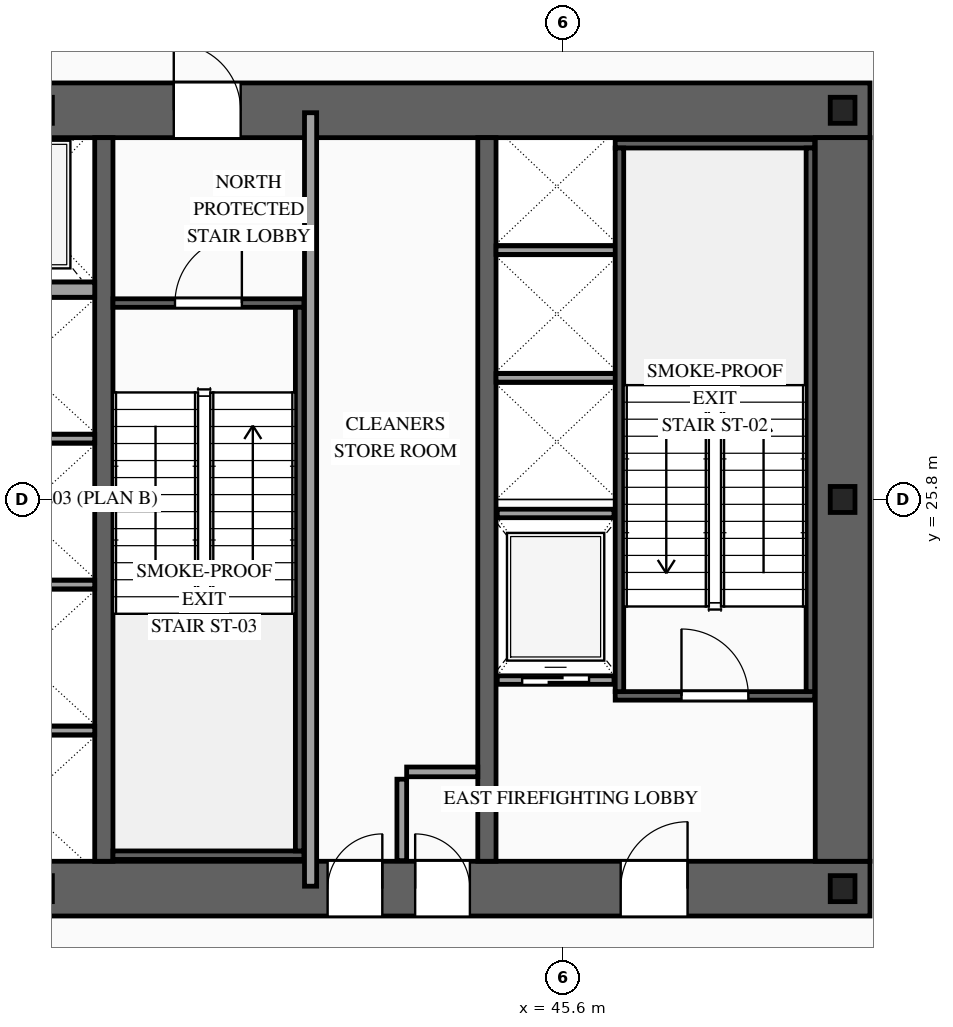
"""IFC4 building model, lengths in metres.
Left out: names, types, materials, properties, quantities, classifications, styles, units other than length and angle.
Written with IfcOpenShell. Run it as: python <this file> out.ifc"""

import sys

from ifc_helpers import new_model, si_unit, direction, frame, frame_2d, origin, origin_2d, place, context, subcontext, project, spatial, rectangle, i_section, extrude, source, transform, mapped, element, fill, save


model = new_model("IFC4")
c1 = context("Model", 3, precision=1e-05, world=origin(), true_north=direction((0.0, 1.0)))
c2 = subcontext(c1, "Body", "Model", "MODEL_VIEW")
j1 = project(units=[si_unit("LENGTHUNIT", "METRE"), si_unit("PLANEANGLEUNIT", "RADIAN")], contexts=[c1])
p1 = place(None, origin())
s1 = spatial("IfcSite", under=j1, at=p1, CompositionType="ELEMENT")
p2 = place(p1, origin())
s2 = spatial("IfcBuilding", under=s1, at=p2, CompositionType="ELEMENT")
p3 = place(p2, frame((0.0, 0.0, 10.2)))
s3 = spatial("IfcBuildingStorey", under=s2, at=p3, CompositionType="ELEMENT", Elevation=10.2)
p4 = place(p3, frame((23.35, 19.4, 0.0), z_axis=(0.0, 0.0, 1.0), x_axis=(1.0, 0.0, 0.0)))
e1 = element("IfcWall", 1, at=p4, inside=s3, PredefinedType="SHEAR", context=c2, shape_type="SweptSolid", body=[
    extrude(rectangle(XDim=27.3, YDim=0.9, at=frame_2d((13.65, 0.0))), origin(), (0.0, 0.0, 1.0), 4.8),
])
p5 = place(p4, frame((2.1, 0.0, 0.0)))
e2 = element("IfcOpeningElement", 2, at=p5, cuts=e1, PredefinedType="OPENING", context=c2, shape_type="SweptSolid", body=[
    extrude(rectangle(XDim=1.1, YDim=2.2, at=frame_2d((0.55, 1.1))), frame((0.0, 0.465, 0.0), z_axis=(0.0, -1.0, 0.0), x_axis=(1.0, 0.0, 0.0)), (0.0, 0.0, 1.0), 0.93),
])
p6 = place(p4, frame((10.0, 0.0, 0.0)))
e3 = element("IfcOpeningElement", 3, at=p6, cuts=e1, PredefinedType="OPENING", context=c2, shape_type="SweptSolid", body=[
    extrude(rectangle(XDim=1.1, YDim=2.2, at=frame_2d((0.55, 1.1))), frame((0.0, 0.465, 0.0), z_axis=(0.0, -1.0, 0.0), x_axis=(1.0, 0.0, 0.0)), (0.0, 0.0, 1.0), 0.93),
])
p7 = place(p4, frame((23.2, 0.0, 0.0)))
e4 = element("IfcOpeningElement", 4, at=p7, cuts=e1, PredefinedType="OPENING", context=c2, shape_type="SweptSolid", body=[
    extrude(rectangle(XDim=1.1, YDim=2.2, at=frame_2d((0.55, 1.1))), frame((0.0, 0.465, 0.0), z_axis=(0.0, -1.0, 0.0), x_axis=(1.0, 0.0, 0.0)), (0.0, 0.0, 1.0), 0.93),
])
p8 = place(p4, frame((19.82, 0.0, 0.0)))
e5 = element("IfcOpeningElement", 5, at=p8, cuts=e1, PredefinedType="OPENING", context=c2, shape_type="SweptSolid", body=[
    extrude(rectangle(XDim=0.9, YDim=2.15, at=frame_2d((0.45, 1.075))), frame((0.0, 0.465, 0.0), z_axis=(0.0, -1.0, 0.0), x_axis=(1.0, 0.0, 0.0)), (0.0, 0.0, 1.0), 0.93),
])
p9 = place(p4, frame((18.38, 0.0, 0.0)))
e6 = element("IfcOpeningElement", 6, at=p9, cuts=e1, PredefinedType="OPENING", context=c2, shape_type="SweptSolid", body=[
    extrude(rectangle(XDim=0.9, YDim=2.15, at=frame_2d((0.45, 1.075))), frame((0.0, 0.465, 0.0), z_axis=(0.0, -1.0, 0.0), x_axis=(1.0, 0.0, 0.0)), (0.0, 0.0, 1.0), 0.93),
])
p10 = place(p3, frame((23.35, 32.2, 0.0), z_axis=(0.0, 0.0, 1.0), x_axis=(1.0, 0.0, 0.0)))
e7 = element("IfcWall", 7, at=p10, inside=s3, PredefinedType="SHEAR", context=c2, shape_type="SweptSolid", body=[
    extrude(rectangle(XDim=27.3, YDim=0.9, at=frame_2d((13.65, 0.0))), origin(), (0.0, 0.0, 1.0), 4.8),
])
p11 = place(p10, frame((4.72, 0.0, 0.0)))
e8 = element("IfcOpeningElement", 8, at=p11, cuts=e7, PredefinedType="OPENING", context=c2, shape_type="SweptSolid", body=[
    extrude(rectangle(XDim=0.9, YDim=2.15, at=frame_2d((0.45, 1.075))), frame((0.0, 0.465, 0.0), z_axis=(0.0, -1.0, 0.0), x_axis=(1.0, 0.0, 0.0)), (0.0, 0.0, 1.0), 0.93),
])
p12 = place(p10, frame((10.0, 0.0, 0.0)))
e9 = element("IfcOpeningElement", 9, at=p12, cuts=e7, PredefinedType="OPENING", context=c2, shape_type="SweptSolid", body=[
    extrude(rectangle(XDim=1.1, YDim=2.2, at=frame_2d((0.55, 1.1))), frame((0.0, 0.465, 0.0), z_axis=(0.0, -1.0, 0.0), x_axis=(1.0, 0.0, 0.0)), (0.0, 0.0, 1.0), 0.93),
])
p13 = place(p10, frame((15.85, 0.0, 0.0)))
e10 = element("IfcOpeningElement", 10, at=p13, cuts=e7, PredefinedType="OPENING", context=c2, shape_type="SweptSolid", body=[
    extrude(rectangle(XDim=1.1, YDim=2.2, at=frame_2d((0.55, 1.1))), frame((0.0, 0.465, 0.0), z_axis=(0.0, -1.0, 0.0), x_axis=(1.0, 0.0, 0.0)), (0.0, 0.0, 1.0), 0.93),
])
m1 = source(origin(), c2, "Body", "SweptSolid", [
    extrude(rectangle(XDim=11.9, YDim=0.9, at=frame_2d((5.95, 0.0))), origin(), (0.0, 0.0, 1.0), 4.8),
])
p14 = place(p3, frame((50.2, 19.85, 0.0), z_axis=(0.0, 0.0, 1.0), x_axis=(0.0, 1.0, 0.0)))
e11 = element("IfcWall", 11, at=p14, inside=s3, PredefinedType="SHEAR", context=c2, shape_type="MappedRepresentation", body=[
    mapped(m1, transform((0.0, 0.0, 0.0), scale=1.0)),
])
m2 = source(origin(), c2, "Body", "SweptSolid", [
    extrude(rectangle(XDim=11.9, YDim=0.3, at=frame_2d((5.95, 0.0))), origin(), (0.0, 0.0, 1.0), 4.8),
])
for number, where, z_axis, x_axis in (
    (12, (38.05, 19.85, 0.0), (0.0, 0.0, 1.0), (0.0, 1.0, 0.0)),
    (13, (44.35, 19.85, 0.0), (0.0, 0.0, 1.0), (0.0, 1.0, 0.0)),
):
    element("IfcWall", number, at=place(p3, frame(where, z_axis=z_axis, x_axis=x_axis)), inside=s3, PredefinedType="SOLIDWALL", context=c2, shape_type="MappedRepresentation", body=[
        mapped(m2, transform((0.0, 0.0, 0.0), scale=1.0)),
    ])
m3 = source(origin(), c2, "Body", "SweptSolid", [
    extrude(i_section(OverallWidth=0.407, OverallDepth=0.428, WebThickness=0.02, FlangeThickness=0.035, at=origin_2d()), origin(), (0.0, 0.0, 1.0), 4.8),
])
for number, where, z_axis, x_axis in (
    (14, (37.0, 19.4, 0.0), (0.0, 0.0, 1.0), (1.0, 0.0, 0.0)),
    (15, (50.2, 19.4, 0.0), (0.0, 0.0, 1.0), (1.0, 0.0, 0.0)),
    (16, (50.2, 25.8, 0.0), (0.0, 0.0, 1.0), (1.0, 0.0, 0.0)),
    (17, (37.0, 32.2, 0.0), (0.0, 0.0, 1.0), (1.0, 0.0, 0.0)),
    (18, (50.2, 32.2, 0.0), (0.0, 0.0, 1.0), (1.0, 0.0, 0.0)),
):
    element("IfcColumn", number, at=place(p3, frame(where, z_axis=z_axis, x_axis=x_axis)), inside=s3, PredefinedType="COLUMN", context=c2, shape_type="MappedRepresentation", body=[
        mapped(m3, transform((0.0, 0.0, 0.0), scale=1.0)),
    ])
p15 = place(p3, frame((44.52, 22.83, 0.0), z_axis=(0.0, 0.0, 1.0), x_axis=(1.0, 0.0, 0.0)))
e19 = element("IfcWall", 19, at=p15, inside=s3, PredefinedType="SOLIDWALL", context=c2, shape_type="SweptSolid", body=[
    extrude(rectangle(XDim=1.92, YDim=0.14, at=frame_2d((0.96, 0.0))), origin(), (0.0, 0.0, 1.0), 4.52),
])
p16 = place(p15, frame((0.41, 0.0, 0.0)))
e20 = element("IfcOpeningElement", 20, at=p16, cuts=e19, PredefinedType="OPENING", context=c2, shape_type="SweptSolid", body=[
    extrude(rectangle(XDim=1.1, YDim=2.2, at=frame_2d((0.55, 1.1))), frame((0.0, 0.085, 0.0), z_axis=(0.0, -1.0, 0.0), x_axis=(1.0, 0.0, 0.0)), (0.0, 0.0, 1.0), 0.17),
])
m4 = source(origin(), c2, "Body", "SweptSolid", [
    extrude(rectangle(XDim=1.92, YDim=0.14, at=frame_2d((0.96, 0.0))), origin(), (0.0, 0.0, 1.0), 4.52),
])
p17 = place(p3, frame((44.52, 25.57, 0.0), z_axis=(0.0, 0.0, 1.0), x_axis=(1.0, 0.0, 0.0)))
e21 = element("IfcWall", 21, at=p17, inside=s3, PredefinedType="SOLIDWALL", context=c2, shape_type="MappedRepresentation", body=[
    mapped(m4, transform((0.0, 0.0, 0.0), scale=1.0)),
])
m5 = source(origin(), c2, "Body", "SweptSolid", [
    extrude(rectangle(XDim=2.4, YDim=0.14, at=frame_2d((1.2, 0.0))), origin(), (0.0, 0.0, 1.0), 4.52),
])
for number, where, z_axis, x_axis in (
    (22, (35.5, 22.0, 0.0), (0.0, 0.0, 1.0), (1.0, 0.0, 0.0)),
    (23, (35.5, 24.4, 0.0), (0.0, 0.0, 1.0), (1.0, 0.0, 0.0)),
    (24, (35.5, 26.8, 0.0), (0.0, 0.0, 1.0), (1.0, 0.0, 0.0)),
):
    element("IfcWall", number, at=place(p3, frame(where, z_axis=z_axis, x_axis=x_axis)), inside=s3, PredefinedType="SOLIDWALL", context=c2, shape_type="MappedRepresentation", body=[
        mapped(m5, transform((0.0, 0.0, 0.0), scale=1.0)),
    ])
m6 = source(origin(), c2, "Body", "SweptSolid", [
    extrude(rectangle(XDim=2.4, YDim=0.25, at=frame_2d((1.2, 0.0))), origin(), (0.0, 0.0, 1.0), 4.52),
])
p18 = place(p3, frame((35.5, 29.25, 0.0), z_axis=(0.0, 0.0, 1.0), x_axis=(1.0, 0.0, 0.0)))
e25 = element("IfcWall", 25, at=p18, inside=s3, PredefinedType="SOLIDWALL", context=c2, shape_type="MappedRepresentation", body=[
    mapped(m6, transform((0.0, 0.0, 0.0), scale=1.0)),
])
m7 = source(origin(), c2, "Body", "SweptSolid", [
    extrude(rectangle(XDim=2.0, YDim=0.14, at=frame_2d((1.0, 0.0))), origin(), (0.0, 0.0, 1.0), 4.52),
])
for number, where, z_axis, x_axis in (
    (26, (44.5, 27.8, 0.0), (0.0, 0.0, 1.0), (1.0, 0.0, 0.0)),
    (27, (44.5, 29.9, 0.0), (0.0, 0.0, 1.0), (1.0, 0.0, 0.0)),
):
    element("IfcWall", number, at=place(p3, frame(where, z_axis=z_axis, x_axis=x_axis)), inside=s3, PredefinedType="SOLIDWALL", context=c2, shape_type="MappedRepresentation", body=[
        mapped(m7, transform((0.0, 0.0, 0.0), scale=1.0)),
    ])
p19 = place(p3, frame((46.46, 22.57, 0.0), z_axis=(0.0, 0.0, 1.0), x_axis=(1.0, 0.0, 0.0)))
e28 = element("IfcWall", 28, at=p19, inside=s3, PredefinedType="SOLIDWALL", context=c2, shape_type="SweptSolid", body=[
    extrude(rectangle(XDim=3.28, YDim=0.14, at=frame_2d((1.64, 0.0))), origin(), (0.0, 0.0, 1.0), 4.52),
])
p20 = place(p19, frame((1.09, 0.0, 0.0)))
e29 = element("IfcOpeningElement", 29, at=p20, cuts=e28, PredefinedType="OPENING", context=c2, shape_type="SweptSolid", body=[
    extrude(rectangle(XDim=1.1, YDim=2.2, at=frame_2d((0.55, 1.1))), frame((0.0, 0.085, 0.0), z_axis=(0.0, -1.0, 0.0), x_axis=(1.0, 0.0, 0.0)), (0.0, 0.0, 1.0), 0.17),
])
m8 = source(origin(), c2, "Body", "SweptSolid", [
    extrude(rectangle(XDim=3.28, YDim=0.14, at=frame_2d((1.64, 0.0))), origin(), (0.0, 0.0, 1.0), 4.52),
])
p21 = place(p3, frame((46.46, 31.65, 0.0), z_axis=(0.0, 0.0, 1.0), x_axis=(1.0, 0.0, 0.0)))
e30 = element("IfcWall", 30, at=p21, inside=s3, PredefinedType="SOLIDWALL", context=c2, shape_type="MappedRepresentation", body=[
    mapped(m8, transform((0.0, 0.0, 0.0), scale=1.0)),
])
m9 = source(origin(), c2, "Body", "SweptSolid", [
    extrude(rectangle(XDim=8.94, YDim=0.14, at=frame_2d((4.47, 0.0))), origin(), (0.0, 0.0, 1.0), 4.52),
])
for number, where, z_axis, x_axis in (
    (31, (46.53, 22.64, 0.0), (0.0, 0.0, 1.0), (0.0, 1.0, 0.0)),
    (32, (49.67, 22.64, 0.0), (0.0, 0.0, 1.0), (0.0, 1.0, 0.0)),
):
    element("IfcWall", number, at=place(p3, frame(where, z_axis=z_axis, x_axis=x_axis)), inside=s3, PredefinedType="SOLIDWALL", context=c2, shape_type="MappedRepresentation", body=[
        mapped(m9, transform((0.0, 0.0, 0.0), scale=1.0)),
    ])
p22 = place(p3, frame((38.2, 29.03, 0.0), z_axis=(0.0, 0.0, 1.0), x_axis=(1.0, 0.0, 0.0)))
e33 = element("IfcWall", 33, at=p22, inside=s3, PredefinedType="SOLIDWALL", context=c2, shape_type="SweptSolid", body=[
    extrude(rectangle(XDim=3.14, YDim=0.14, at=frame_2d((1.57, 0.0))), origin(), (0.0, 0.0, 1.0), 4.52),
])
p23 = place(p22, frame((1.02, 0.0, 0.0)))
e34 = element("IfcOpeningElement", 34, at=p23, cuts=e33, PredefinedType="OPENING", context=c2, shape_type="SweptSolid", body=[
    extrude(rectangle(XDim=1.1, YDim=2.2, at=frame_2d((0.55, 1.1))), frame((0.0, 0.085, 0.0), z_axis=(0.0, -1.0, 0.0), x_axis=(1.0, 0.0, 0.0)), (0.0, 0.0, 1.0), 0.17),
])
m10 = source(origin(), c2, "Body", "SweptSolid", [
    extrude(rectangle(XDim=3.14, YDim=0.14, at=frame_2d((1.57, 0.0))), origin(), (0.0, 0.0, 1.0), 4.52),
])
p24 = place(p3, frame((38.2, 19.95, 0.0), z_axis=(0.0, 0.0, 1.0), x_axis=(1.0, 0.0, 0.0)))
e35 = element("IfcWall", 35, at=p24, inside=s3, PredefinedType="SOLIDWALL", context=c2, shape_type="MappedRepresentation", body=[
    mapped(m10, transform((0.0, 0.0, 0.0), scale=1.0)),
])
m11 = source(origin(), c2, "Body", "SweptSolid", [
    extrude(rectangle(XDim=8.94, YDim=0.14, at=frame_2d((4.47, 0.0))), origin(), (0.0, 0.0, 1.0), 4.52),
])
p25 = place(p3, frame((41.27, 20.02, 0.0), z_axis=(0.0, 0.0, 1.0), x_axis=(0.0, 1.0, 0.0)))
e36 = element("IfcWall", 36, at=p25, inside=s3, PredefinedType="SOLIDWALL", context=c2, shape_type="MappedRepresentation", body=[
    mapped(m11, transform((0.0, 0.0, 0.0), scale=1.0)),
])
m12 = source(origin(), c2, "Body", "SweptSolid", [
    extrude(rectangle(XDim=1.34, YDim=0.16, at=frame_2d((0.67, 0.0))), origin(), (0.0, 0.0, 1.0), 4.52),
])
p26 = place(p3, frame((42.95, 19.86, 0.0), z_axis=(0.0, 0.0, 1.0), x_axis=(0.0, 1.0, 0.0)))
e37 = element("IfcWall", 37, at=p26, inside=s3, PredefinedType="PARTITIONING", context=c2, shape_type="MappedRepresentation", body=[
    mapped(m12, transform((0.0, 0.0, 0.0), scale=1.0)),
])
m13 = source(origin(), c2, "Body", "SweptSolid", [
    extrude(rectangle(XDim=1.17, YDim=0.16, at=frame_2d((0.585, 0.0))), origin(), (0.0, 0.0, 1.0), 4.52),
])
p27 = place(p3, frame((43.03, 21.32, 0.0), z_axis=(0.0, 0.0, 1.0), x_axis=(1.0, 0.0, 0.0)))
e38 = element("IfcWall", 38, at=p27, inside=s3, PredefinedType="PARTITIONING", context=c2, shape_type="MappedRepresentation", body=[
    mapped(m13, transform((0.0, 0.0, 0.0), scale=1.0)),
])
m14 = source(origin(), c2, "Body", "SweptSolid", [
    extrude(rectangle(XDim=12.72, YDim=0.2, at=frame_2d((6.36, 0.0))), origin(), (0.0, 0.0, 1.0), 4.52),
])
p28 = place(p3, frame((41.45, 19.44, 0.0), z_axis=(0.0, 0.0, 1.0), x_axis=(0.0, 1.0, 0.0)))
e39 = element("IfcWall", 39, at=p28, inside=s3, PredefinedType="PARTITIONING", context=c2, shape_type="MappedRepresentation", body=[
    mapped(m14, transform((0.0, 0.0, 0.0), scale=1.0)),
])
m15 = source(origin(), c2, "Body", "SweptSolid", [
    extrude(rectangle(XDim=1.1, YDim=2.2, at=frame_2d((0.55, 1.1))), frame((0.0, 0.025, 0.0), z_axis=(0.0, -1.0, 0.0), x_axis=(1.0, 0.0, 0.0)), (0.0, 0.0, 1.0), 0.05),
])
p29 = place(p16, origin())
e40 = element("IfcDoor", 40, at=p29, inside=s3, OperationType="SLIDING_TO_RIGHT", PredefinedType="DOOR", context=c2, shape_type="MappedRepresentation", body=[
    mapped(m15, transform((0.0, 0.0, 0.0), scale=1.0)),
])
fill(e20, e40)
m16 = source(origin(), c2, "Body", "SweptSolid", [
    extrude(rectangle(XDim=1.1, YDim=2.2, at=frame_2d((0.55, 1.1))), frame((0.0, 0.025, 0.0), z_axis=(0.0, -1.0, 0.0), x_axis=(1.0, 0.0, 0.0)), (0.0, 0.0, 1.0), 0.05),
])
p30 = place(p20, origin())
e41 = element("IfcDoor", 41, at=p30, inside=s3, OperationType="SINGLE_SWING_LEFT", PredefinedType="DOOR", context=c2, shape_type="MappedRepresentation", body=[
    mapped(m16, transform((0.0, 0.0, 0.0), scale=1.0)),
])
fill(e29, e41)
p31 = place(p23, origin())
e42 = element("IfcDoor", 42, at=p31, inside=s3, OperationType="SINGLE_SWING_RIGHT", PredefinedType="DOOR", context=c2, shape_type="MappedRepresentation", body=[
    mapped(m16, transform((0.0, 0.0, 0.0), scale=1.0)),
])
fill(e34, e42)
p32 = place(p7, origin())
e43 = element("IfcDoor", 43, at=p32, inside=s3, OperationType="SINGLE_SWING_RIGHT", PredefinedType="DOOR", context=c2, shape_type="MappedRepresentation", body=[
    mapped(m16, transform((0.0, 0.0, 0.0), scale=1.0)),
])
fill(e4, e43)
p33 = place(p13, origin())
e44 = element("IfcDoor", 44, at=p33, inside=s3, OperationType="SINGLE_SWING_LEFT", PredefinedType="DOOR", context=c2, shape_type="MappedRepresentation", body=[
    mapped(m16, transform((0.0, 0.0, 0.0), scale=1.0)),
])
fill(e10, e44)
m17 = source(origin(), c2, "Body", "SweptSolid", [
    extrude(rectangle(XDim=0.9, YDim=2.15, at=frame_2d((0.45, 1.075))), frame((0.0, 0.025, 0.0), z_axis=(0.0, -1.0, 0.0), x_axis=(1.0, 0.0, 0.0)), (0.0, 0.0, 1.0), 0.05),
])
p34 = place(p8, origin())
e45 = element("IfcDoor", 45, at=p34, inside=s3, OperationType="SINGLE_SWING_LEFT", PredefinedType="DOOR", context=c2, shape_type="MappedRepresentation", body=[
    mapped(m17, transform((0.0, 0.0, 0.0), scale=1.0)),
])
fill(e5, e45)
p35 = place(p9, origin())
e46 = element("IfcDoor", 46, at=p35, inside=s3, OperationType="SINGLE_SWING_RIGHT", PredefinedType="DOOR", context=c2, shape_type="MappedRepresentation", body=[
    mapped(m17, transform((0.0, 0.0, 0.0), scale=1.0)),
])
fill(e6, e46)
save(model, sys.argv[1])
